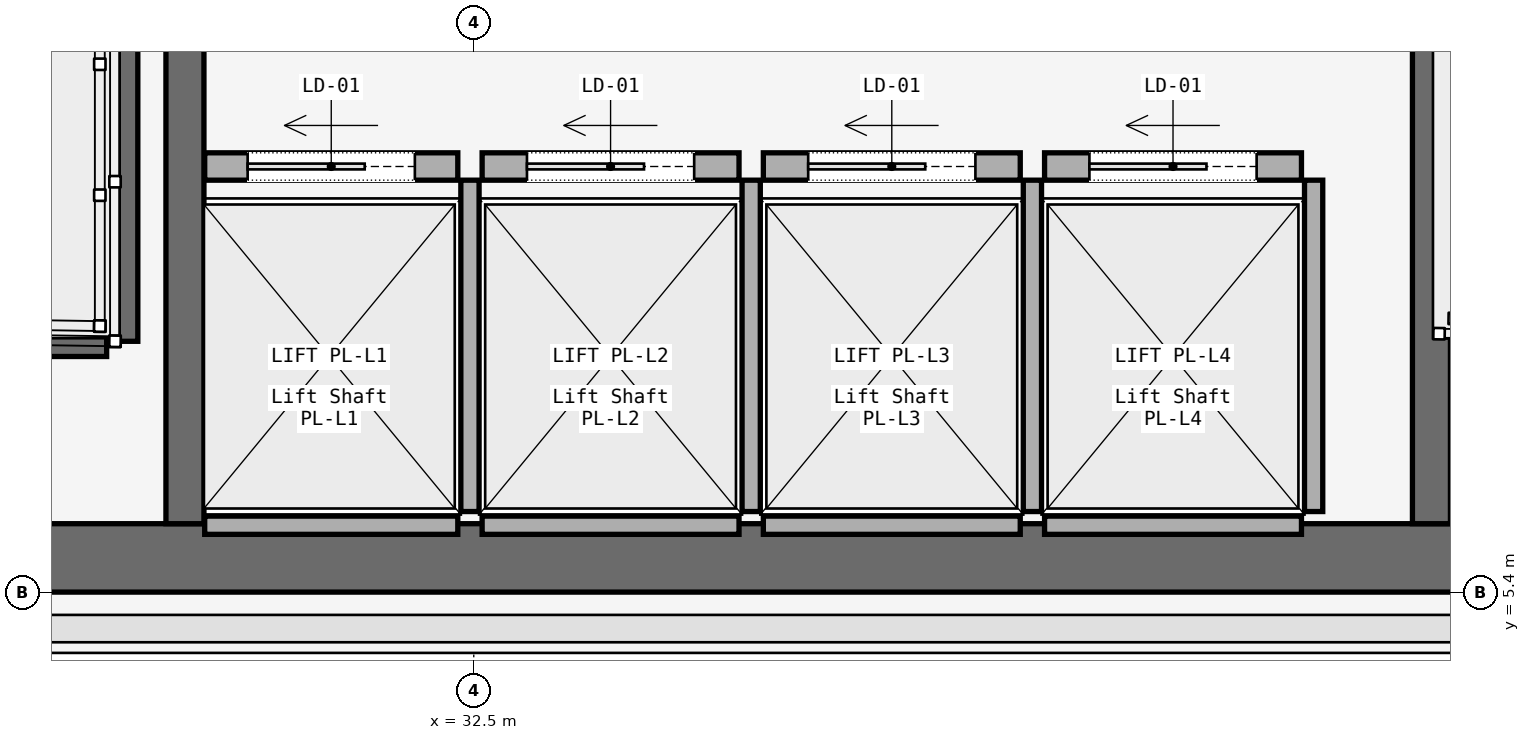
"""IFC4 building model, lengths in metres.
Left out: names, types, materials, properties, quantities, classifications, styles, units other than length and angle.
Written with IfcOpenShell. Run it as: python <this file> out.ifc"""

import sys

from ifc_helpers import new_model, si_unit, direction, frame, frame_2d, origin, place, context, subcontext, project, spatial, rectangle, extrude, element, fill, save


model = new_model("IFC4")
c1 = context("Model", 3, precision=1e-05, world=origin(), true_north=direction((0.0, 1.0)))
c2 = subcontext(c1, "Body", "Model", "MODEL_VIEW")
j1 = project(units=[si_unit("LENGTHUNIT", "METRE"), si_unit("PLANEANGLEUNIT", "RADIAN")], contexts=[c1])
p1 = place(None, origin())
s1 = spatial("IfcSite", under=j1, at=p1, CompositionType="ELEMENT")
p2 = place(p1, origin())
s2 = spatial("IfcBuilding", under=s1, at=p2, CompositionType="ELEMENT")
p3 = place(p2, frame((0.0, 0.0, 70.2)))
s3 = spatial("IfcBuildingStorey", under=s2, at=p3, CompositionType="ELEMENT", Elevation=70.2)
p4 = place(p3, frame((26.45, 5.625, 0.0), z_axis=(0.0, 0.0, 1.0), x_axis=(1.0, 0.0, 0.0)))
e1 = element("IfcWall", 1, at=p4, inside=s3, PredefinedType="SOLIDWALL", context=c2, shape_type="SweptSolid", body=[
    extrude(rectangle(XDim=31.1, YDim=0.45, at=frame_2d((15.55, 0.0))), origin(), (0.0, 0.0, 1.0), 3.58),
])
for number, where, z_axis, x_axis in (
    (2, (30.6, 5.85, 0.0), (0.0, 0.0, 1.0), (0.0, 1.0, 0.0)),
    (3, (38.8, 5.85, 0.0), (0.0, 0.0, 1.0), (0.0, 1.0, 0.0)),
):
    element("IfcWall", number, at=place(p3, frame(where, z_axis=z_axis, x_axis=x_axis)), inside=s3, PredefinedType="SOLIDWALL", context=c2, shape_type="SweptSolid", body=[
        extrude(rectangle(XDim=8.9, YDim=0.25, at=frame_2d((4.45, 0.0))), origin(), (0.0, 0.0, 1.0), 3.58),
    ])
p5 = place(p3, frame((30.19, 14.7, 0.0), z_axis=(0.0, 0.0, 1.0), x_axis=(0.0, -1.0, 0.0)))
e4 = element("IfcWall", 4, at=p5, inside=s3, PredefinedType="SOLIDWALL", context=c2, shape_type="SweptSolid", body=[
    extrude(rectangle(XDim=7.65, YDim=0.2, at=frame_2d((3.825, 0.0))), origin(), (0.0, 0.0, 1.0), 3.8),
])
p6 = place(p3, frame((26.97, 7.05, 0.0), z_axis=(0.0, 0.0, 1.0), x_axis=(1.0, 0.0, 0.0)))
e5 = element("IfcWall", 5, at=p6, inside=s3, PredefinedType="SOLIDWALL", context=c2, shape_type="SweptSolid", body=[
    extrude(rectangle(XDim=3.115, YDim=0.2, at=frame_2d((1.558, 0.0))), origin(), (0.0, 0.0, 1.0), 3.8),
])
p7 = place(p3, frame((30.73, 8.2, 0.0), z_axis=(0.0, 0.0, 1.0), x_axis=(1.0, 0.0, 0.0)))
e6 = element("IfcWall", 6, at=p7, inside=s3, PredefinedType="SOLIDWALL", context=c2, shape_type="SweptSolid", body=[
    extrude(rectangle(XDim=1.665, YDim=0.18, at=frame_2d((0.833, 0.0))), origin(), (0.0, 0.0, 1.0), 2.95),
])
p8 = place(p7, frame((0.282, 0.0, 0.0)))
e7 = element("IfcOpeningElement", 7, at=p8, cuts=e6, PredefinedType="OPENING", context=c2, shape_type="SweptSolid", body=[
    extrude(rectangle(XDim=1.1, YDim=2.2, at=frame_2d((0.55, 1.1))), frame((0.0, 0.09, 0.0), z_axis=(0.0, -1.0, 0.0), x_axis=(1.0, 0.0, 0.0)), (0.0, 0.0, 1.0), 0.18),
])
p9 = place(p3, frame((30.73, 5.84, 0.0), z_axis=(0.0, 0.0, 1.0), x_axis=(1.0, 0.0, 0.0)))
e8 = element("IfcWall", 8, at=p9, inside=s3, PredefinedType="SOLIDWALL", context=c2, shape_type="SweptSolid", body=[
    extrude(rectangle(XDim=1.665, YDim=0.12, at=frame_2d((0.833, 0.0))), origin(), (0.0, 0.0, 1.0), 2.95),
])
p10 = place(p3, frame((32.475, 5.93, 0.0), z_axis=(0.0, 0.0, 1.0), x_axis=(0.0, 1.0, 0.0)))
e9 = element("IfcWall", 9, at=p10, inside=s3, PredefinedType="SOLIDWALL", context=c2, shape_type="SweptSolid", body=[
    extrude(rectangle(XDim=2.18, YDim=0.12, at=frame_2d((1.09, 0.0))), origin(), (0.0, 0.0, 1.0), 2.95),
])
p11 = place(p3, frame((32.555, 8.2, 0.0), z_axis=(0.0, 0.0, 1.0), x_axis=(1.0, 0.0, 0.0)))
e10 = element("IfcWall", 10, at=p11, inside=s3, PredefinedType="SOLIDWALL", context=c2, shape_type="SweptSolid", body=[
    extrude(rectangle(XDim=1.69, YDim=0.18, at=frame_2d((0.845, 0.0))), origin(), (0.0, 0.0, 1.0), 2.95),
])
p12 = place(p11, frame((0.295, 0.0, 0.0)))
e11 = element("IfcOpeningElement", 11, at=p12, cuts=e10, PredefinedType="OPENING", context=c2, shape_type="SweptSolid", body=[
    extrude(rectangle(XDim=1.1, YDim=2.2, at=frame_2d((0.55, 1.1))), frame((0.0, 0.09, 0.0), z_axis=(0.0, -1.0, 0.0), x_axis=(1.0, 0.0, 0.0)), (0.0, 0.0, 1.0), 0.18),
])
p13 = place(p3, frame((32.555, 5.84, 0.0), z_axis=(0.0, 0.0, 1.0), x_axis=(1.0, 0.0, 0.0)))
e12 = element("IfcWall", 12, at=p13, inside=s3, PredefinedType="SOLIDWALL", context=c2, shape_type="SweptSolid", body=[
    extrude(rectangle(XDim=1.69, YDim=0.12, at=frame_2d((0.845, 0.0))), origin(), (0.0, 0.0, 1.0), 2.95),
])
p14 = place(p3, frame((34.325, 5.93, 0.0), z_axis=(0.0, 0.0, 1.0), x_axis=(0.0, 1.0, 0.0)))
e13 = element("IfcWall", 13, at=p14, inside=s3, PredefinedType="SOLIDWALL", context=c2, shape_type="SweptSolid", body=[
    extrude(rectangle(XDim=2.18, YDim=0.12, at=frame_2d((1.09, 0.0))), origin(), (0.0, 0.0, 1.0), 2.95),
])
p15 = place(p3, frame((34.405, 8.2, 0.0), z_axis=(0.0, 0.0, 1.0), x_axis=(1.0, 0.0, 0.0)))
e14 = element("IfcWall", 14, at=p15, inside=s3, PredefinedType="SOLIDWALL", context=c2, shape_type="SweptSolid", body=[
    extrude(rectangle(XDim=1.69, YDim=0.18, at=frame_2d((0.845, 0.0))), origin(), (0.0, 0.0, 1.0), 2.95),
])
p16 = place(p15, frame((0.295, 0.0, 0.0)))
e15 = element("IfcOpeningElement", 15, at=p16, cuts=e14, PredefinedType="OPENING", context=c2, shape_type="SweptSolid", body=[
    extrude(rectangle(XDim=1.1, YDim=2.2, at=frame_2d((0.55, 1.1))), frame((0.0, 0.09, 0.0), z_axis=(0.0, -1.0, 0.0), x_axis=(1.0, 0.0, 0.0)), (0.0, 0.0, 1.0), 0.18),
])
p17 = place(p3, frame((34.405, 5.84, 0.0), z_axis=(0.0, 0.0, 1.0), x_axis=(1.0, 0.0, 0.0)))
e16 = element("IfcWall", 16, at=p17, inside=s3, PredefinedType="SOLIDWALL", context=c2, shape_type="SweptSolid", body=[
    extrude(rectangle(XDim=1.69, YDim=0.12, at=frame_2d((0.845, 0.0))), origin(), (0.0, 0.0, 1.0), 2.95),
])
p18 = place(p3, frame((36.175, 5.93, 0.0), z_axis=(0.0, 0.0, 1.0), x_axis=(0.0, 1.0, 0.0)))
e17 = element("IfcWall", 17, at=p18, inside=s3, PredefinedType="SOLIDWALL", context=c2, shape_type="SweptSolid", body=[
    extrude(rectangle(XDim=2.18, YDim=0.12, at=frame_2d((1.09, 0.0))), origin(), (0.0, 0.0, 1.0), 2.95),
])
p19 = place(p3, frame((36.255, 8.2, 0.0), z_axis=(0.0, 0.0, 1.0), x_axis=(1.0, 0.0, 0.0)))
e18 = element("IfcWall", 18, at=p19, inside=s3, PredefinedType="SOLIDWALL", context=c2, shape_type="SweptSolid", body=[
    extrude(rectangle(XDim=1.69, YDim=0.18, at=frame_2d((0.845, 0.0))), origin(), (0.0, 0.0, 1.0), 2.95),
])
p20 = place(p19, frame((0.295, 0.0, 0.0)))
e19 = element("IfcOpeningElement", 19, at=p20, cuts=e18, PredefinedType="OPENING", context=c2, shape_type="SweptSolid", body=[
    extrude(rectangle(XDim=1.1, YDim=2.2, at=frame_2d((0.55, 1.1))), frame((0.0, 0.09, 0.0), z_axis=(0.0, -1.0, 0.0), x_axis=(1.0, 0.0, 0.0)), (0.0, 0.0, 1.0), 0.18),
])
p21 = place(p3, frame((36.255, 5.84, 0.0), z_axis=(0.0, 0.0, 1.0), x_axis=(1.0, 0.0, 0.0)))
e20 = element("IfcWall", 20, at=p21, inside=s3, PredefinedType="SOLIDWALL", context=c2, shape_type="SweptSolid", body=[
    extrude(rectangle(XDim=1.69, YDim=0.12, at=frame_2d((0.845, 0.0))), origin(), (0.0, 0.0, 1.0), 2.95),
])
p22 = place(p3, frame((38.025, 5.93, 0.0), z_axis=(0.0, 0.0, 1.0), x_axis=(0.0, 1.0, 0.0)))
e21 = element("IfcWall", 21, at=p22, inside=s3, PredefinedType="SOLIDWALL", context=c2, shape_type="SweptSolid", body=[
    extrude(rectangle(XDim=2.18, YDim=0.12, at=frame_2d((1.09, 0.0))), origin(), (0.0, 0.0, 1.0), 2.95),
])
p23 = place(p8, origin())
e22 = element("IfcDoor", 22, at=p23, inside=s3, OperationType="SLIDING_TO_LEFT", PredefinedType="DOOR", context=c2, shape_type="SweptSolid", body=[
    extrude(rectangle(XDim=1.1, YDim=2.2, at=frame_2d((0.55, 1.1))), frame((0.0, 0.025, 0.0), z_axis=(0.0, -1.0, 0.0), x_axis=(1.0, 0.0, 0.0)), (0.0, 0.0, 1.0), 0.05),
])
fill(e7, e22)
p24 = place(p12, origin())
e23 = element("IfcDoor", 23, at=p24, inside=s3, OperationType="SLIDING_TO_LEFT", PredefinedType="DOOR", context=c2, shape_type="SweptSolid", body=[
    extrude(rectangle(XDim=1.1, YDim=2.2, at=frame_2d((0.55, 1.1))), frame((0.0, 0.025, 0.0), z_axis=(0.0, -1.0, 0.0), x_axis=(1.0, 0.0, 0.0)), (0.0, 0.0, 1.0), 0.05),
])
fill(e11, e23)
p25 = place(p16, origin())
e24 = element("IfcDoor", 24, at=p25, inside=s3, OperationType="SLIDING_TO_LEFT", PredefinedType="DOOR", context=c2, shape_type="SweptSolid", body=[
    extrude(rectangle(XDim=1.1, YDim=2.2, at=frame_2d((0.55, 1.1))), frame((0.0, 0.025, 0.0), z_axis=(0.0, -1.0, 0.0), x_axis=(1.0, 0.0, 0.0)), (0.0, 0.0, 1.0), 0.05),
])
fill(e15, e24)
p26 = place(p20, origin())
e25 = element("IfcDoor", 25, at=p26, inside=s3, OperationType="SLIDING_TO_LEFT", PredefinedType="DOOR", context=c2, shape_type="SweptSolid", body=[
    extrude(rectangle(XDim=1.1, YDim=2.2, at=frame_2d((0.55, 1.1))), frame((0.0, 0.025, 0.0), z_axis=(0.0, -1.0, 0.0), x_axis=(1.0, 0.0, 0.0)), (0.0, 0.0, 1.0), 0.05),
])
fill(e19, e25)
save(model, sys.argv[1])
